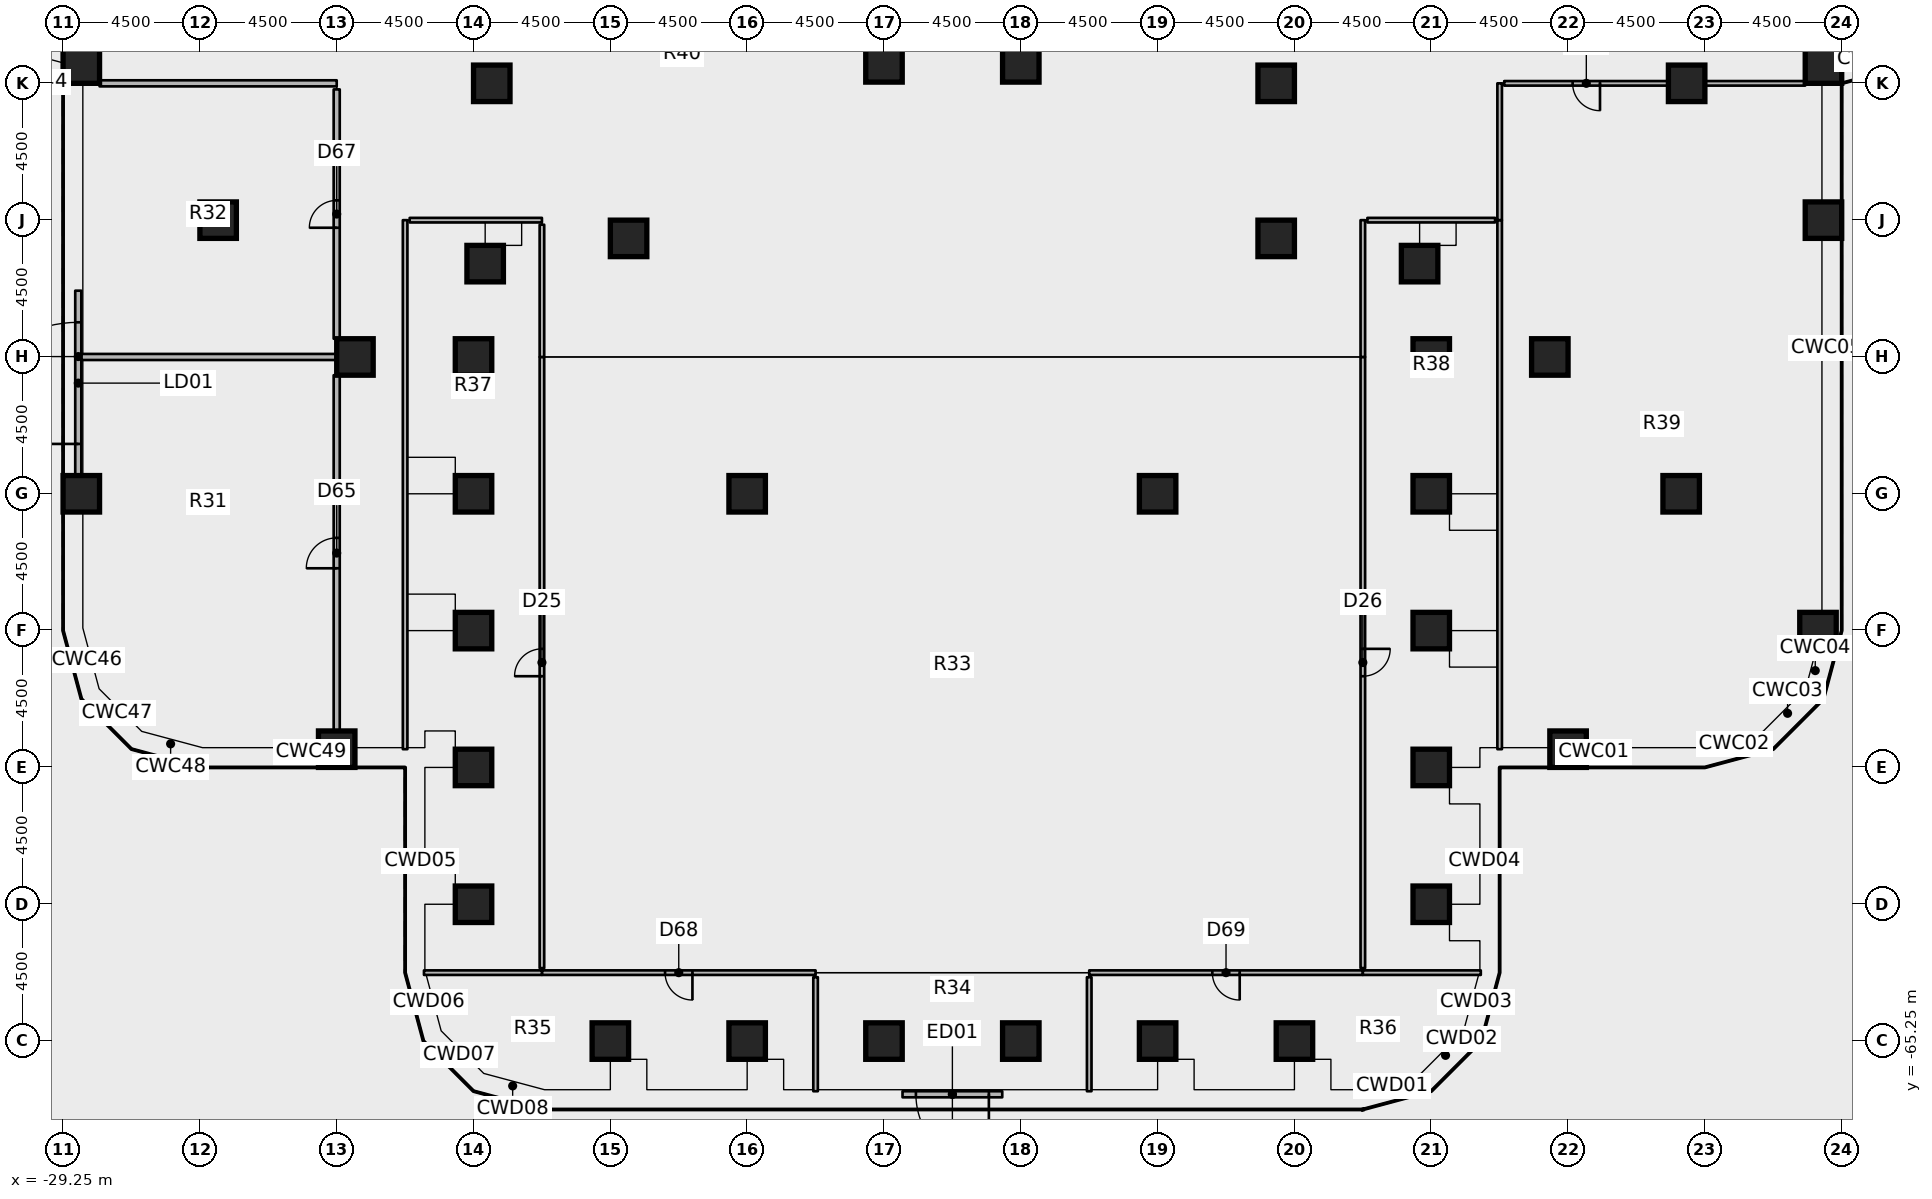
"""IFC4 building model, lengths in metres.
Left out: names, types, materials, properties, quantities, classifications, styles, units other than length and angle.
Written with IfcOpenShell. Run it as: python <this file> out.ifc"""

import sys

from ifc_helpers import new_model, si_unit, direction, frame, frame_2d, origin, origin_2d, place, context, subcontext, project, spatial, rectangle, extrude, element, fill, save


model = new_model("IFC4")
c1 = context("Model", 3, precision=1e-05, world=origin(), true_north=direction((0.0, 1.0)))
c2 = subcontext(c1, "Body", "Model", "MODEL_VIEW")
j1 = project(units=[si_unit("LENGTHUNIT", "METRE"), si_unit("PLANEANGLEUNIT", "RADIAN")], contexts=[c1])
p1 = place(None, origin())
s1 = spatial("IfcSite", under=j1, at=p1, CompositionType="ELEMENT")
p2 = place(p1, origin())
s2 = spatial("IfcBuilding", under=s1, at=p2, CompositionType="ELEMENT")
p3 = place(p2, origin())
s3 = spatial("IfcBuildingStorey", under=s2, at=p3, CompositionType="ELEMENT", Elevation=0.0)
for number, where, z_axis, x_axis in (
    (1, (-28.65, -47.25, 0.0), (0.0, 0.0, 1.0), (1.0, 0.0, 0.0)),
    (2, (-28.65, -33.15, 0.0), (0.0, 0.0, 1.0), (1.0, 0.0, 0.0)),
    (3, (-24.15, -38.25, 0.0), (0.0, 0.0, 1.0), (1.0, 0.0, 0.0)),
    (4, (-20.25, -55.65, 0.0), (0.0, 0.0, 1.0), (1.0, 0.0, 0.0)),
    (5, (-19.65, -42.75, 0.0), (0.0, 0.0, 1.0), (1.0, 0.0, 0.0)),
    (6, (-15.75, -60.75, 0.0), (0.0, 0.0, 1.0), (1.0, 0.0, 0.0)),
    (7, (-15.75, -56.25, 0.0), (0.0, 0.0, 1.0), (1.0, 0.0, 0.0)),
    (8, (-15.75, -51.75, 0.0), (0.0, 0.0, 1.0), (1.0, 0.0, 0.0)),
    (9, (-15.75, -47.25, 0.0), (0.0, 0.0, 1.0), (1.0, 0.0, 0.0)),
    (10, (-15.75, -42.75, 0.0), (0.0, 0.0, 1.0), (1.0, 0.0, 0.0)),
    (11, (-15.367, -39.68, 0.0), (0.0, 0.0, 1.0), (1.0, 0.0, 0.0)),
    (12, (-15.15, -33.75, 0.0), (0.0, 0.0, 1.0), (1.0, 0.0, 0.0)),
    (13, (-11.25, -65.25, 0.0), (0.0, 0.0, 1.0), (1.0, 0.0, 0.0)),
    (14, (-10.65, -38.85, 0.0), (0.0, 0.0, 1.0), (1.0, 0.0, 0.0)),
    (15, (-6.75, -65.25, 0.0), (0.0, 0.0, 1.0), (1.0, 0.0, 0.0)),
    (16, (-6.75, -47.25, 0.0), (0.0, 0.0, 1.0), (1.0, 0.0, 0.0)),
    (17, (-2.25, -65.25, 0.0), (0.0, 0.0, 1.0), (1.0, 0.0, 0.0)),
    (18, (-2.25, -33.11, 0.0), (0.0, 0.0, 1.0), (1.0, 0.0, 0.0)),
    (19, (2.25, -65.25, 0.0), (0.0, 0.0, 1.0), (1.0, 0.0, 0.0)),
    (20, (2.25, -33.11, 0.0), (0.0, 0.0, 1.0), (1.0, 0.0, 0.0)),
    (21, (6.75, -65.25, 0.0), (0.0, 0.0, 1.0), (1.0, 0.0, 0.0)),
    (22, (6.75, -47.25, 0.0), (0.0, 0.0, 1.0), (1.0, 0.0, 0.0)),
    (23, (11.25, -65.25, 0.0), (0.0, 0.0, 1.0), (1.0, 0.0, 0.0)),
    (24, (10.65, -38.85, 0.0), (0.0, 0.0, 1.0), (1.0, 0.0, 0.0)),
    (25, (10.65, -33.75, 0.0), (0.0, 0.0, 1.0), (1.0, 0.0, 0.0)),
    (26, (15.75, -60.75, 0.0), (0.0, 0.0, 1.0), (1.0, 0.0, 0.0)),
    (27, (15.75, -56.25, 0.0), (0.0, 0.0, 1.0), (1.0, 0.0, 0.0)),
    (28, (15.75, -51.75, 0.0), (0.0, 0.0, 1.0), (1.0, 0.0, 0.0)),
    (29, (15.75, -47.25, 0.0), (0.0, 0.0, 1.0), (1.0, 0.0, 0.0)),
    (30, (15.75, -42.75, 0.0), (0.0, 0.0, 1.0), (1.0, 0.0, 0.0)),
    (31, (15.367, -39.68, 0.0), (0.0, 0.0, 1.0), (1.0, 0.0, 0.0)),
    (32, (20.25, -55.65, 0.0), (0.0, 0.0, 1.0), (1.0, 0.0, 0.0)),
    (33, (19.65, -42.75, 0.0), (0.0, 0.0, 1.0), (1.0, 0.0, 0.0)),
    (34, (23.97, -47.25, 0.0), (0.0, 0.0, 1.0), (1.0, 0.0, 0.0)),
    (35, (24.15, -33.75, 0.0), (0.0, 0.0, 1.0), (1.0, 0.0, 0.0)),
    (36, (28.47, -51.75, 0.0), (0.0, 0.0, 1.0), (1.0, 0.0, 0.0)),
    (37, (28.65, -38.25, 0.0), (0.0, 0.0, 1.0), (1.0, 0.0, 0.0)),
    (38, (28.65, -33.15, 0.0), (0.0, 0.0, 1.0), (1.0, 0.0, 0.0)),
):
    element("IfcColumn", number, at=place(p3, frame(where, z_axis=z_axis, x_axis=x_axis)), inside=s3, PredefinedType="COLUMN", context=c2, shape_type="SweptSolid", body=[
        extrude(rectangle(XDim=1.2, YDim=1.2, at=origin_2d()), origin(), (0.0, 0.0, 1.0), 6.55),
    ])
p4 = place(p3, frame((-28.75, -46.65, 0.0), z_axis=(0.0, 0.0, 1.0), x_axis=(0.0, 1.0, 0.0)))
e39 = element("IfcWall", 39, at=p4, inside=s3, PredefinedType="SOLIDWALL", context=c2, shape_type="SweptSolid", body=[
    extrude(rectangle(XDim=6.08, YDim=0.2, at=frame_2d((3.04, 0.0))), origin(), (0.0, 0.0, 1.0), 5.6),
])
p5 = place(p4, frame((1.04, 0.0, 0.0)))
e40 = element("IfcOpeningElement", 40, at=p5, cuts=e39, PredefinedType="OPENING", context=c2, shape_type="SweptSolid", body=[
    extrude(rectangle(XDim=4.0, YDim=4.5, at=frame_2d((2.0, 2.25))), frame((0.0, 0.11, 0.0), z_axis=(0.0, -1.0, 0.0), x_axis=(1.0, 0.0, 0.0)), (0.0, 0.0, 1.0), 0.22),
])
p6 = place(p3, frame((1.64, -67.0, 0.0), z_axis=(0.0, 0.0, 1.0), x_axis=(-1.0, 0.0, 0.0)))
e41 = element("IfcWall", 41, at=p6, inside=s3, PredefinedType="SOLIDWALL", context=c2, shape_type="SweptSolid", body=[
    extrude(rectangle(XDim=3.28, YDim=0.2, at=frame_2d((1.64, 0.0))), origin(), (0.0, 0.0, 1.0), 5.6),
])
p7 = place(p6, frame((0.44, 0.0, 0.0)))
e42 = element("IfcOpeningElement", 42, at=p7, cuts=e41, PredefinedType="OPENING", context=c2, shape_type="SweptSolid", body=[
    extrude(rectangle(XDim=2.4, YDim=2.7, at=frame_2d((1.2, 1.35))), frame((0.0, 0.11, 0.0), z_axis=(0.0, -1.0, 0.0), x_axis=(1.0, 0.0, 0.0)), (0.0, 0.0, 1.0), 0.22),
])
p8 = place(p3, frame((-28.65, -42.75, 0.0), z_axis=(0.0, 0.0, 1.0), x_axis=(1.0, 0.0, 0.0)))
e43 = element("IfcWall", 43, at=p8, inside=s3, PredefinedType="PARTITIONING", context=c2, shape_type="SweptSolid", body=[
    extrude(rectangle(XDim=8.4, YDim=0.2, at=frame_2d((4.2, 0.0))), origin(), (0.0, 0.0, 1.0), 6.55),
])
p9 = place(p3, frame((-20.25, -55.05, 0.0), z_axis=(0.0, 0.0, 1.0), x_axis=(0.0, 1.0, 0.0)))
e44 = element("IfcWall", 44, at=p9, inside=s3, PredefinedType="PARTITIONING", context=c2, shape_type="SweptSolid", body=[
    extrude(rectangle(XDim=11.7, YDim=0.2, at=frame_2d((5.85, 0.0))), origin(), (0.0, 0.0, 1.0), 6.55),
])
p10 = place(p9, frame((5.35, 0.0, 0.0)))
e45 = element("IfcOpeningElement", 45, at=p10, cuts=e44, PredefinedType="OPENING", context=c2, shape_type="SweptSolid", body=[
    extrude(rectangle(XDim=1.0, YDim=2.1, at=frame_2d((0.5, 1.05))), frame((0.0, 0.11, 0.0), z_axis=(0.0, -1.0, 0.0), x_axis=(1.0, 0.0, 0.0)), (0.0, 0.0, 1.0), 0.22),
])
p11 = place(p3, frame((-28.05, -33.75, 0.0), z_axis=(0.0, 0.0, 1.0), x_axis=(1.0, 0.0, 0.0)))
e46 = element("IfcWall", 46, at=p11, inside=s3, PredefinedType="PARTITIONING", context=c2, shape_type="SweptSolid", body=[
    extrude(rectangle(XDim=7.8, YDim=0.2, at=frame_2d((3.9, 0.0))), origin(), (0.0, 0.0, 1.0), 6.55),
])
p12 = place(p3, frame((-20.25, -42.15, 0.0), z_axis=(0.0, 0.0, 1.0), x_axis=(0.0, 1.0, 0.0)))
e47 = element("IfcWall", 47, at=p12, inside=s3, PredefinedType="PARTITIONING", context=c2, shape_type="SweptSolid", body=[
    extrude(rectangle(XDim=8.2, YDim=0.2, at=frame_2d((4.1, 0.0))), origin(), (0.0, 0.0, 1.0), 6.55),
])
p13 = place(p12, frame((3.65, 0.0, 0.0)))
e48 = element("IfcOpeningElement", 48, at=p13, cuts=e47, PredefinedType="OPENING", context=c2, shape_type="SweptSolid", body=[
    extrude(rectangle(XDim=0.9, YDim=2.1, at=frame_2d((0.45, 1.05))), frame((0.0, 0.11, 0.0), z_axis=(0.0, -1.0, 0.0), x_axis=(1.0, 0.0, 0.0)), (0.0, 0.0, 1.0), 0.22),
])
p14 = place(p3, frame((-4.5, -63.0, 0.0), z_axis=(0.0, 0.0, 1.0), x_axis=(-1.0, 0.0, 0.0)))
e49 = element("IfcWall", 49, at=p14, inside=s3, PredefinedType="PARTITIONING", context=c2, shape_type="SweptSolid", body=[
    extrude(rectangle(XDim=9.0, YDim=0.15, at=frame_2d((4.5, 0.0))), origin(), (0.0, 0.0, 1.0), 6.55),
])
p15 = place(p14, frame((4.05, 0.0, 0.0)))
e50 = element("IfcOpeningElement", 50, at=p15, cuts=e49, PredefinedType="OPENING", context=c2, shape_type="SweptSolid", body=[
    extrude(rectangle(XDim=0.9, YDim=2.1, at=frame_2d((0.45, 1.05))), frame((0.0, 0.085, 0.0), z_axis=(0.0, -1.0, 0.0), x_axis=(1.0, 0.0, 0.0)), (0.0, 0.0, 1.0), 0.17),
])
p16 = place(p3, frame((13.5, -63.0, 0.0), z_axis=(0.0, 0.0, 1.0), x_axis=(-1.0, 0.0, 0.0)))
e51 = element("IfcWall", 51, at=p16, inside=s3, PredefinedType="PARTITIONING", context=c2, shape_type="SweptSolid", body=[
    extrude(rectangle(XDim=9.0, YDim=0.15, at=frame_2d((4.5, 0.0))), origin(), (0.0, 0.0, 1.0), 6.55),
])
p17 = place(p16, frame((4.05, 0.0, 0.0)))
e52 = element("IfcOpeningElement", 52, at=p17, cuts=e51, PredefinedType="OPENING", context=c2, shape_type="SweptSolid", body=[
    extrude(rectangle(XDim=0.9, YDim=2.1, at=frame_2d((0.45, 1.05))), frame((0.0, 0.085, 0.0), z_axis=(0.0, -1.0, 0.0), x_axis=(1.0, 0.0, 0.0)), (0.0, 0.0, 1.0), 0.17),
])
p18 = place(p3, frame((-13.5, -62.85, 0.0), z_axis=(0.0, 0.0, 1.0), x_axis=(0.0, 1.0, 0.0)))
e53 = element("IfcWall", 53, at=p18, inside=s3, PredefinedType="PARTITIONING", context=c2, shape_type="SweptSolid", body=[
    extrude(rectangle(XDim=20.1, YDim=0.15, at=frame_2d((10.05, 0.0))), origin(), (0.0, 0.0, 1.0), 6.55),
])
p19 = place(p18, frame((9.6, 0.0, 0.0)))
e54 = element("IfcOpeningElement", 54, at=p19, cuts=e53, PredefinedType="OPENING", context=c2, shape_type="SweptSolid", body=[
    extrude(rectangle(XDim=0.9, YDim=2.1, at=frame_2d((0.45, 1.05))), frame((0.0, 0.085, 0.0), z_axis=(0.0, -1.0, 0.0), x_axis=(1.0, 0.0, 0.0)), (0.0, 0.0, 1.0), 0.17),
])
p20 = place(p3, frame((13.5, -42.75, 0.0), z_axis=(0.0, 0.0, 1.0), x_axis=(0.0, -1.0, 0.0)))
e55 = element("IfcWall", 55, at=p20, inside=s3, PredefinedType="PARTITIONING", context=c2, shape_type="SweptSolid", body=[
    extrude(rectangle(XDim=20.1, YDim=0.15, at=frame_2d((10.05, 0.0))), origin(), (0.0, 0.0, 1.0), 6.55),
])
p21 = place(p20, frame((9.6, 0.0, 0.0)))
e56 = element("IfcOpeningElement", 56, at=p21, cuts=e55, PredefinedType="OPENING", context=c2, shape_type="SweptSolid", body=[
    extrude(rectangle(XDim=0.9, YDim=2.1, at=frame_2d((0.45, 1.05))), frame((0.0, 0.085, 0.0), z_axis=(0.0, -1.0, 0.0), x_axis=(1.0, 0.0, 0.0)), (0.0, 0.0, 1.0), 0.17),
])
for number, where, z_axis, x_axis in (
    (57, (-4.5, -66.9, 0.0), (0.0, 0.0, 1.0), (0.0, 1.0, 0.0)),
    (58, (4.5, -63.15, 0.0), (0.0, 0.0, 1.0), (0.0, -1.0, 0.0)),
):
    element("IfcWall", number, at=place(p3, frame(where, z_axis=z_axis, x_axis=x_axis)), inside=s3, PredefinedType="PARTITIONING", context=c2, shape_type="SweptSolid", body=[
        extrude(rectangle(XDim=3.75, YDim=0.15, at=frame_2d((1.875, 0.0))), origin(), (0.0, 0.0, 1.0), 6.55),
    ])
for number, where, z_axis, x_axis in (
    (59, (-17.38, -63.0, 0.0), (0.0, 0.0, 1.0), (1.0, 0.0, 0.0)),
    (60, (13.5, -63.0, 0.0), (0.0, 0.0, 1.0), (1.0, 0.0, 0.0)),
):
    element("IfcWall", number, at=place(p3, frame(where, z_axis=z_axis, x_axis=x_axis)), inside=s3, PredefinedType="PARTITIONING", context=c2, shape_type="SweptSolid", body=[
        extrude(rectangle(XDim=3.88, YDim=0.15, at=frame_2d((1.94, 0.0))), origin(), (0.0, 0.0, 1.0), 6.55),
    ])
p22 = place(p3, frame((-18.0, -55.65, 0.0), z_axis=(0.0, 0.0, 1.0), x_axis=(0.0, 1.0, 0.0)))
e61 = element("IfcWall", 61, at=p22, inside=s3, PredefinedType="PARTITIONING", context=c2, shape_type="SweptSolid", body=[
    extrude(rectangle(XDim=17.4, YDim=0.15, at=frame_2d((8.7, 0.0))), origin(), (0.0, 0.0, 1.0), 6.55),
])
for number, where, z_axis, x_axis in (
    (62, (-17.85, -38.25, 0.0), (0.0, 0.0, 1.0), (1.0, 0.0, 0.0)),
    (63, (-13.5, -38.4, 0.0), (0.0, 0.0, 1.0), (0.0, -1.0, 0.0)),
):
    element("IfcWall", number, at=place(p3, frame(where, z_axis=z_axis, x_axis=x_axis)), inside=s3, PredefinedType="PARTITIONING", context=c2, shape_type="SweptSolid", body=[
        extrude(rectangle(XDim=4.35, YDim=0.15, at=frame_2d((2.175, 0.0))), origin(), (0.0, 0.0, 1.0), 6.55),
    ])
p23 = place(p3, frame((18.0, -38.25, 0.0), z_axis=(0.0, 0.0, 1.0), x_axis=(0.0, -1.0, 0.0)))
e64 = element("IfcWall", 64, at=p23, inside=s3, PredefinedType="PARTITIONING", context=c2, shape_type="SweptSolid", body=[
    extrude(rectangle(XDim=17.4, YDim=0.15, at=frame_2d((8.7, 0.0))), origin(), (0.0, 0.0, 1.0), 6.55),
])
p24 = place(p3, frame((13.5, -42.75, 0.0), z_axis=(0.0, 0.0, 1.0), x_axis=(0.0, 1.0, 0.0)))
e65 = element("IfcWall", 65, at=p24, inside=s3, PredefinedType="PARTITIONING", context=c2, shape_type="SweptSolid", body=[
    extrude(rectangle(XDim=4.5, YDim=0.15, at=frame_2d((2.25, 0.0))), origin(), (0.0, 0.0, 1.0), 6.55),
])
p25 = place(p3, frame((13.65, -38.25, 0.0), z_axis=(0.0, 0.0, 1.0), x_axis=(1.0, 0.0, 0.0)))
e66 = element("IfcWall", 66, at=p25, inside=s3, PredefinedType="PARTITIONING", context=c2, shape_type="SweptSolid", body=[
    extrude(rectangle(XDim=4.2, YDim=0.15, at=frame_2d((2.1, 0.0))), origin(), (0.0, 0.0, 1.0), 6.55),
])
p26 = place(p3, frame((18.0, -38.25, 0.0), z_axis=(0.0, 0.0, 1.0), x_axis=(0.0, 1.0, 0.0)))
e67 = element("IfcWall", 67, at=p26, inside=s3, PredefinedType="PARTITIONING", context=c2, shape_type="SweptSolid", body=[
    extrude(rectangle(XDim=4.5, YDim=0.15, at=frame_2d((2.25, 0.0))), origin(), (0.0, 0.0, 1.0), 6.55),
])
p27 = place(p3, frame((23.55, -33.75, 0.0), z_axis=(0.0, 0.0, 1.0), x_axis=(-1.0, 0.0, 0.0)))
e68 = element("IfcWall", 68, at=p27, inside=s3, PredefinedType="PARTITIONING", context=c2, shape_type="SweptSolid", body=[
    extrude(rectangle(XDim=5.4, YDim=0.15, at=frame_2d((2.7, 0.0))), origin(), (0.0, 0.0, 1.0), 6.55),
])
p28 = place(p27, frame((2.25, 0.0, 0.0)))
e69 = element("IfcOpeningElement", 69, at=p28, cuts=e68, PredefinedType="OPENING", context=c2, shape_type="SweptSolid", body=[
    extrude(rectangle(XDim=0.9, YDim=2.1, at=frame_2d((0.45, 1.05))), frame((0.0, 0.085, 0.0), z_axis=(0.0, -1.0, 0.0), x_axis=(1.0, 0.0, 0.0)), (0.0, 0.0, 1.0), 0.17),
])
p29 = place(p3, frame((24.75, -33.75, 0.0), z_axis=(0.0, 0.0, 1.0), x_axis=(1.0, 0.0, 0.0)))
e70 = element("IfcWall", 70, at=p29, inside=s3, PredefinedType="PARTITIONING", context=c2, shape_type="SweptSolid", body=[
    extrude(rectangle(XDim=3.3, YDim=0.15, at=frame_2d((1.65, 0.0))), origin(), (0.0, 0.0, 1.0), 6.55),
])
p30 = place(p5, origin())
e71 = element("IfcDoor", 71, at=p30, inside=s3, OperationType="SINGLE_SWING_LEFT", PredefinedType="DOOR", context=c2, shape_type="SweptSolid", body=[
    extrude(rectangle(XDim=4.0, YDim=4.5, at=frame_2d((2.0, 2.25))), frame((0.0, 0.025, 0.0), z_axis=(0.0, -1.0, 0.0), x_axis=(1.0, 0.0, 0.0)), (0.0, 0.0, 1.0), 0.05),
])
fill(e40, e71)
p31 = place(p7, origin())
e72 = element("IfcDoor", 72, at=p31, inside=s3, OperationType="SINGLE_SWING_LEFT", PredefinedType="DOOR", context=c2, shape_type="SweptSolid", body=[
    extrude(rectangle(XDim=2.4, YDim=2.7, at=frame_2d((1.2, 1.35))), frame((0.0, 0.025, 0.0), z_axis=(0.0, -1.0, 0.0), x_axis=(1.0, 0.0, 0.0)), (0.0, 0.0, 1.0), 0.05),
])
fill(e42, e72)
p32 = place(p10, origin())
e73 = element("IfcDoor", 73, at=p32, inside=s3, OperationType="SINGLE_SWING_LEFT", PredefinedType="DOOR", context=c2, shape_type="SweptSolid", body=[
    extrude(rectangle(XDim=1.0, YDim=2.1, at=frame_2d((0.5, 1.05))), frame((0.0, 0.025, 0.0), z_axis=(0.0, -1.0, 0.0), x_axis=(1.0, 0.0, 0.0)), (0.0, 0.0, 1.0), 0.05),
])
fill(e45, e73)
p33 = place(p13, origin())
e74 = element("IfcDoor", 74, at=p33, inside=s3, OperationType="SINGLE_SWING_LEFT", PredefinedType="DOOR", context=c2, shape_type="SweptSolid", body=[
    extrude(rectangle(XDim=0.9, YDim=2.1, at=frame_2d((0.45, 1.05))), frame((0.0, 0.025, 0.0), z_axis=(0.0, -1.0, 0.0), x_axis=(1.0, 0.0, 0.0)), (0.0, 0.0, 1.0), 0.05),
])
fill(e48, e74)
p34 = place(p15, origin())
e75 = element("IfcDoor", 75, at=p34, inside=s3, OperationType="SINGLE_SWING_LEFT", PredefinedType="DOOR", context=c2, shape_type="SweptSolid", body=[
    extrude(rectangle(XDim=0.9, YDim=2.1, at=frame_2d((0.45, 1.05))), frame((0.0, 0.025, 0.0), z_axis=(0.0, -1.0, 0.0), x_axis=(1.0, 0.0, 0.0)), (0.0, 0.0, 1.0), 0.05),
])
fill(e50, e75)
p35 = place(p17, origin())
e76 = element("IfcDoor", 76, at=p35, inside=s3, OperationType="SINGLE_SWING_LEFT", PredefinedType="DOOR", context=c2, shape_type="SweptSolid", body=[
    extrude(rectangle(XDim=0.9, YDim=2.1, at=frame_2d((0.45, 1.05))), frame((0.0, 0.025, 0.0), z_axis=(0.0, -1.0, 0.0), x_axis=(1.0, 0.0, 0.0)), (0.0, 0.0, 1.0), 0.05),
])
fill(e52, e76)
p36 = place(p19, origin())
e77 = element("IfcDoor", 77, at=p36, inside=s3, OperationType="SINGLE_SWING_LEFT", PredefinedType="DOOR", context=c2, shape_type="SweptSolid", body=[
    extrude(rectangle(XDim=0.9, YDim=2.1, at=frame_2d((0.45, 1.05))), frame((0.0, 0.025, 0.0), z_axis=(0.0, -1.0, 0.0), x_axis=(1.0, 0.0, 0.0)), (0.0, 0.0, 1.0), 0.05),
])
fill(e54, e77)
p37 = place(p21, origin())
e78 = element("IfcDoor", 78, at=p37, inside=s3, OperationType="SINGLE_SWING_LEFT", PredefinedType="DOOR", context=c2, shape_type="SweptSolid", body=[
    extrude(rectangle(XDim=0.9, YDim=2.1, at=frame_2d((0.45, 1.05))), frame((0.0, 0.025, 0.0), z_axis=(0.0, -1.0, 0.0), x_axis=(1.0, 0.0, 0.0)), (0.0, 0.0, 1.0), 0.05),
])
fill(e56, e78)
p38 = place(p28, origin())
e79 = element("IfcDoor", 79, at=p38, inside=s3, OperationType="SINGLE_SWING_LEFT", PredefinedType="DOOR", context=c2, shape_type="SweptSolid", body=[
    extrude(rectangle(XDim=0.9, YDim=2.1, at=frame_2d((0.45, 1.05))), frame((0.0, 0.025, 0.0), z_axis=(0.0, -1.0, 0.0), x_axis=(1.0, 0.0, 0.0)), (0.0, 0.0, 1.0), 0.05),
])
fill(e69, e79)
save(model, sys.argv[1])
